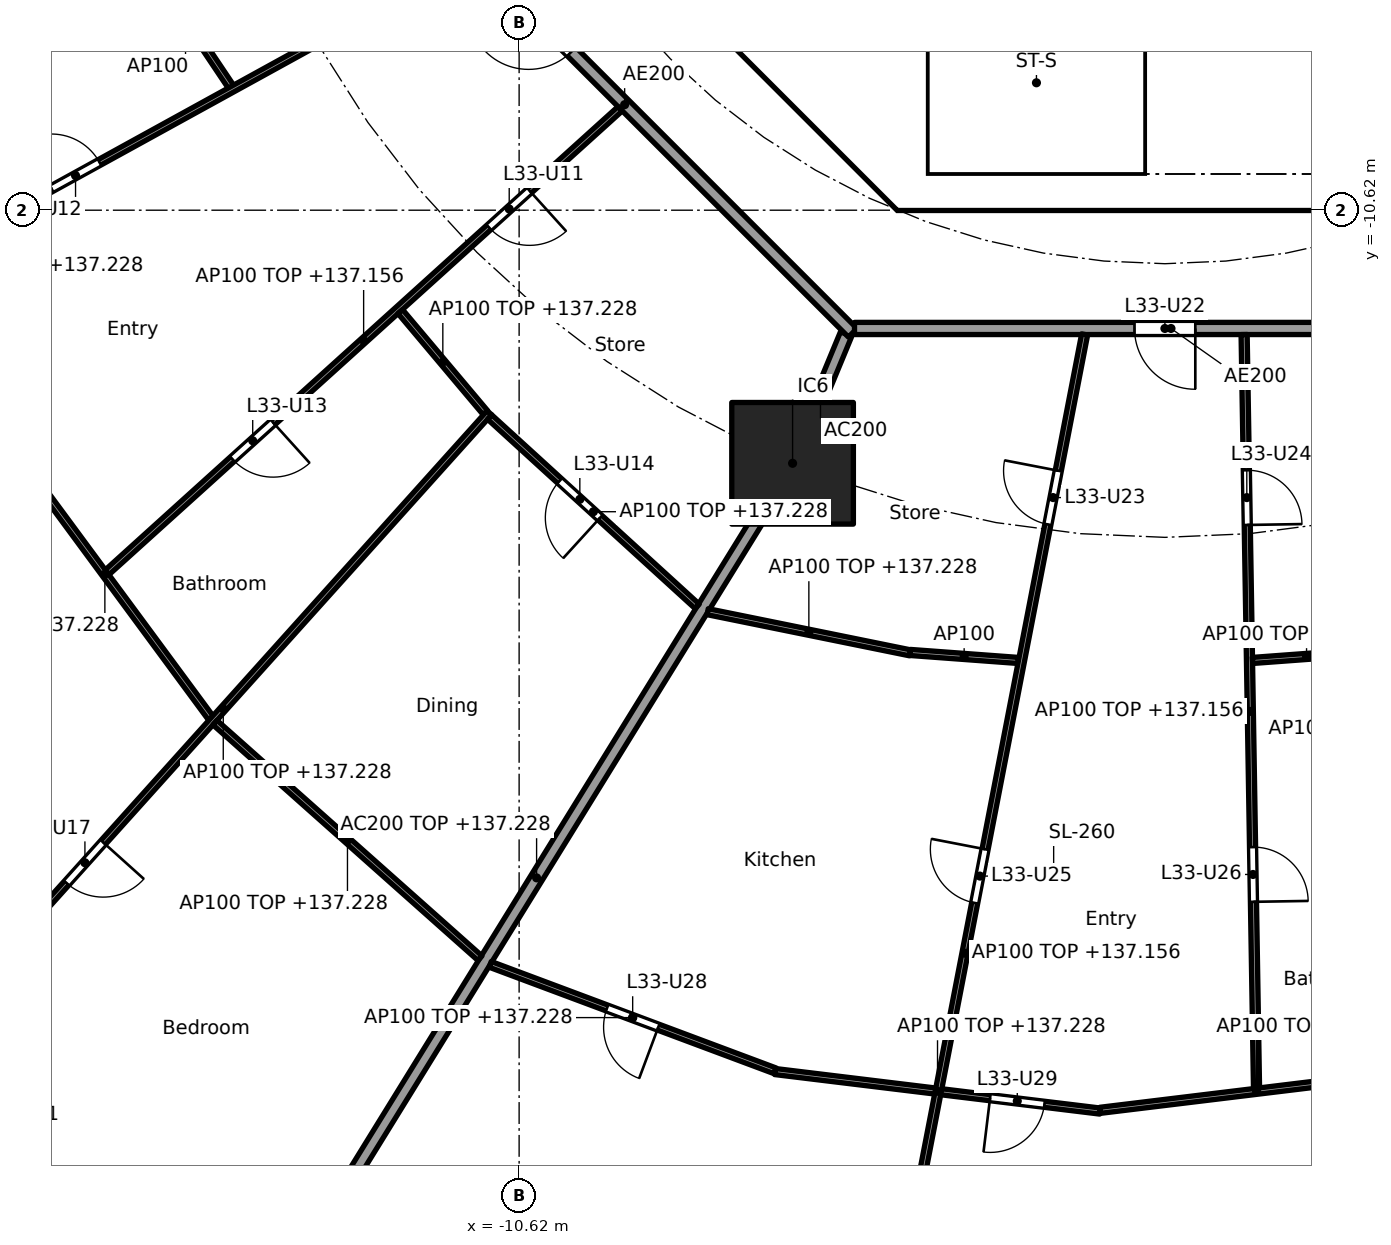
"""IFC4 building model, lengths in metres.
Left out: names, types, materials, properties, quantities, classifications, styles, units other than length and angle.
Written with IfcOpenShell. Run it as: python <this file> out.ifc"""

import sys

from ifc_helpers import new_model, si_unit, direction, frame, frame_2d, origin, origin_2d, place, context, subcontext, project, spatial, polyline, rectangle, outline, extrude, element, fill, save


model = new_model("IFC4")
c1 = context("Model", 3, precision=1e-05, world=origin(), true_north=direction((0.0, 1.0)))
c2 = subcontext(c1, "Body", "Model", "MODEL_VIEW")
j1 = project(units=[si_unit("LENGTHUNIT", "METRE"), si_unit("PLANEANGLEUNIT", "RADIAN")], contexts=[c1])
p1 = place(None, origin())
s1 = spatial("IfcSite", under=j1, at=p1, CompositionType="ELEMENT")
p2 = place(p1, origin())
s2 = spatial("IfcBuilding", under=s1, at=p2, CompositionType="ELEMENT")
p3 = place(p2, frame((0.0, 0.0, 134.4)))
s3 = spatial("IfcBuildingStorey", under=s2, at=p3, CompositionType="ELEMENT", Elevation=134.4)
p4 = place(p3, frame((-6.123, -14.782, 0.0), z_axis=(0.0, 0.0, 1.0), x_axis=(1.0, 0.0, 0.0)))
e1 = element("IfcColumn", 1, at=p4, inside=s3, PredefinedType="COLUMN", context=c2, shape_type="SweptSolid", body=[
    extrude(rectangle(XDim=2.0, YDim=2.0, at=origin_2d()), origin(), (0.0, 0.0, 1.0), 3.7),
])
p5 = place(p3, frame((-9.988, -4.613, 0.0), z_axis=(0.0, 0.0, 1.0), x_axis=(0.707106781187, -0.707106781187, 0.0)))
e2 = element("IfcWall", 2, at=p5, inside=s3, PredefinedType="SHEAR", context=c2, shape_type="SweptSolid", body=[
    extrude(rectangle(XDim=7.602, YDim=0.6, at=frame_2d((3.801, 0.0))), origin(), (0.0, 0.0, 1.0), 3.44),
])
p6 = place(p5, frame((6.151, 0.0, 0.0)))
e3 = element("IfcOpeningElement", 3, at=p6, cuts=e2, PredefinedType="OPENING", context=c2, shape_type="SweptSolid", body=[
    extrude(rectangle(XDim=1.1, YDim=2.1, at=frame_2d((0.55, 1.05))), frame((0.0, 0.31, 0.0), z_axis=(0.0, -1.0, 0.0), x_axis=(1.0, 0.0, 0.0)), (0.0, 0.0, 1.0), 0.62),
])
p7 = place(p3, origin())
e4 = element("IfcWall", 4, at=p7, inside=s3, PredefinedType="SHEAR", context=c2, shape_type="SweptSolid", body=[
    extrude(outline(polyline([(-4.152, -10.025), (4.152, -10.025), (4.401, -9.776), (4.825, -10.2), (4.401, -10.625), (-4.401, -10.625), (-4.825, -10.2), (-4.401, -9.776), (-4.152, -10.025)])), origin(), (0.0, 0.0, 1.0), 3.44),
])
p8 = place(p3, origin())
e5 = element("IfcWall", 5, at=p8, inside=s3, PredefinedType="SOLIDWALL", context=c2, shape_type="SweptSolid", body=[
    extrude(outline(polyline([(-3.9, -10.025), (-4.1, -10.025), (-4.1, -7.025), (-3.9, -7.025), (-3.9, -10.025)])), origin(), (0.0, 0.0, 1.0), 3.44),
])
p9 = place(p3, frame((-5.243, -12.657, 0.0), z_axis=(0.0, 0.0, 1.0), x_axis=(-0.382818775282, -0.923823460025, 0.0)))
e6 = element("IfcWall", 6, at=p9, inside=s3, PredefinedType="PARTITIONING", context=c2, shape_type="SweptSolid", body=[
    extrude(rectangle(XDim=2.201, YDim=0.2, at=frame_2d((1.101, 0.0))), origin(), (0.0, 0.0, 1.0), 3.44),
])
p10 = place(p3, frame((-6.149, -14.825, 0.0), z_axis=(0.0, 0.0, 1.0), x_axis=(-0.525406383516, -0.85085141603, 0.0)))
e7 = element("IfcWall", 7, at=p10, inside=s3, PredefinedType="PARTITIONING", context=c2, shape_type="SweptSolid", body=[
    extrude(rectangle(XDim=15.925, YDim=0.2, at=frame_2d((7.962, 0.0))), origin(), (0.0, 0.0, 1.0), 2.828),
])
p11 = place(p3, frame((-12.635, -5.134, 0.0), z_axis=(0.0, 0.0, 1.0), x_axis=(0.707106781187, -0.707106781187, 0.0)))
e8 = element("IfcWall", 8, at=p11, inside=s3, PredefinedType="PARTITIONING", context=c2, shape_type="SweptSolid", body=[
    extrude(rectangle(XDim=10.609, YDim=0.2, at=frame_2d((5.305, 0.0))), origin(), (0.0, 0.0, 1.0), 3.44),
])
p12 = place(p11, frame((3.07, 0.0, 0.0)))
e9 = element("IfcOpeningElement", 9, at=p12, cuts=e8, PredefinedType="OPENING", context=c2, shape_type="SweptSolid", body=[
    extrude(rectangle(XDim=1.0, YDim=2.1, at=frame_2d((0.5, 1.05))), frame((0.0, 0.11, 0.0), z_axis=(0.0, -1.0, 0.0), x_axis=(1.0, 0.0, 0.0)), (0.0, 0.0, 1.0), 0.22),
])
p13 = place(p3, frame((-5.104, -12.565, 0.0), z_axis=(0.0, 0.0, 1.0), x_axis=(1.0, 0.0, 0.0)))
e10 = element("IfcWall", 10, at=p13, inside=s3, PredefinedType="PARTITIONING", context=c2, shape_type="SweptSolid", body=[
    extrude(rectangle(XDim=10.409, YDim=0.2, at=frame_2d((5.205, 0.0))), origin(), (0.0, 0.0, 1.0), 3.44),
])
p14 = place(p13, frame((4.604, 0.0, 0.0)))
e11 = element("IfcOpeningElement", 11, at=p14, cuts=e10, PredefinedType="OPENING", context=c2, shape_type="SweptSolid", body=[
    extrude(rectangle(XDim=1.0, YDim=2.1, at=frame_2d((0.5, 1.05))), frame((0.0, 0.11, 0.0), z_axis=(0.0, -1.0, 0.0), x_axis=(1.0, 0.0, 0.0)), (0.0, 0.0, 1.0), 0.22),
])
p15 = place(p3, frame((-16.532, -6.84, 0.0), z_axis=(0.0, 0.0, 1.0), x_axis=(0.556994773624, -0.830515997531, 0.0)))
e12 = element("IfcWall", 12, at=p15, inside=s3, PredefinedType="PARTITIONING", context=c2, shape_type="SweptSolid", body=[
    extrude(rectangle(XDim=2.183, YDim=0.1, at=frame_2d((1.092, 0.0))), origin(), (0.0, 0.0, 1.0), 3.44),
])
p16 = place(p3, frame((-11.426, -6.479, 0.0), z_axis=(0.0, 0.0, 1.0), x_axis=(-0.876110392495, -0.482110547657, 0.0)))
e13 = element("IfcWall", 13, at=p16, inside=s3, PredefinedType="PARTITIONING", context=c2, shape_type="SweptSolid", body=[
    extrude(rectangle(XDim=16.955, YDim=0.1, at=frame_2d((8.478, 0.0))), origin(), (0.0, 0.0, 1.0), 2.756),
])
p17 = place(p16, frame((0.35, 0.0, 0.0)))
e14 = element("IfcOpeningElement", 14, at=p17, cuts=e13, PredefinedType="OPENING", context=c2, shape_type="SweptSolid", body=[
    extrude(rectangle(XDim=0.9, YDim=2.1, at=frame_2d((0.45, 1.05))), frame((0.0, 0.06, 0.0), z_axis=(0.0, -1.0, 0.0), x_axis=(1.0, 0.0, 0.0)), (0.0, 0.0, 1.0), 0.12),
])
p18 = place(p16, frame((6.957, 0.0, 0.0)))
e15 = element("IfcOpeningElement", 15, at=p18, cuts=e13, PredefinedType="OPENING", context=c2, shape_type="SweptSolid", body=[
    extrude(rectangle(XDim=0.9, YDim=2.1, at=frame_2d((0.45, 1.05))), frame((0.0, 0.06, 0.0), z_axis=(0.0, -1.0, 0.0), x_axis=(1.0, 0.0, 0.0)), (0.0, 0.0, 1.0), 0.12),
])
p19 = place(p16, frame((13.206, 0.0, 0.0)))
e16 = element("IfcOpeningElement", 16, at=p19, cuts=e13, PredefinedType="OPENING", context=c2, shape_type="SweptSolid", body=[
    extrude(rectangle(XDim=0.9, YDim=2.1, at=frame_2d((0.45, 1.05))), frame((0.0, 0.06, 0.0), z_axis=(0.0, -1.0, 0.0), x_axis=(1.0, 0.0, 0.0)), (0.0, 0.0, 1.0), 0.12),
])
p20 = place(p3, frame((-19.176, -14.244, 0.0), z_axis=(0.0, 0.0, 1.0), x_axis=(0.593532053206, -0.80481035146, 0.0)))
e17 = element("IfcWall", 17, at=p20, inside=s3, PredefinedType="PARTITIONING", context=c2, shape_type="SweptSolid", body=[
    extrude(rectangle(XDim=5.876, YDim=0.1, at=frame_2d((2.938, 0.0))), origin(), (0.0, 0.0, 1.0), 2.828),
])
p21 = place(p3, frame((-8.959, -8.952, 0.0), z_axis=(0.0, 0.0, 1.0), x_axis=(-0.741982736283, -0.670418987692, 0.0)))
e18 = element("IfcWall", 18, at=p21, inside=s3, PredefinedType="PARTITIONING", context=c2, shape_type="SweptSolid", body=[
    extrude(rectangle(XDim=11.371, YDim=0.1, at=frame_2d((5.685, 0.0))), origin(), (0.0, 0.0, 1.0), 2.756),
])
p22 = place(p21, frame((2.009, 0.0, 0.0)))
e19 = element("IfcOpeningElement", 19, at=p22, cuts=e18, PredefinedType="OPENING", context=c2, shape_type="SweptSolid", body=[
    extrude(rectangle(XDim=0.9, YDim=2.1, at=frame_2d((0.45, 1.05))), frame((0.0, 0.06, 0.0), z_axis=(0.0, -1.0, 0.0), x_axis=(1.0, 0.0, 0.0)), (0.0, 0.0, 1.0), 0.12),
])
p23 = place(p21, frame((7.694, 0.0, 0.0)))
e20 = element("IfcOpeningElement", 20, at=p23, cuts=e18, PredefinedType="OPENING", context=c2, shape_type="SweptSolid", body=[
    extrude(rectangle(XDim=0.9, YDim=2.1, at=frame_2d((0.45, 1.05))), frame((0.0, 0.06, 0.0), z_axis=(0.0, -1.0, 0.0), x_axis=(1.0, 0.0, 0.0)), (0.0, 0.0, 1.0), 0.12),
])
p24 = place(p3, frame((-12.575, -12.286, 0.0), z_axis=(0.0, 0.0, 1.0), x_axis=(0.644052758448, -0.764981074495, 0.0)))
e21 = element("IfcWall", 21, at=p24, inside=s3, PredefinedType="PARTITIONING", context=c2, shape_type="SweptSolid", body=[
    extrude(rectangle(XDim=2.174, YDim=0.1, at=frame_2d((1.087, 0.0))), origin(), (0.0, 0.0, 1.0), 2.828),
])
p25 = place(p3, frame((-11.109, -13.951, 0.0), z_axis=(0.0, 0.0, 1.0), x_axis=(-0.668488676691, -0.743722319913, 0.0)))
e22 = element("IfcWall", 22, at=p25, inside=s3, PredefinedType="PARTITIONING", context=c2, shape_type="SweptSolid", body=[
    extrude(rectangle(XDim=13.094, YDim=0.1, at=frame_2d((6.547, 0.0))), origin(), (0.0, 0.0, 1.0), 2.828),
])
p26 = place(p25, frame((9.5, 0.0, 0.0)))
e23 = element("IfcOpeningElement", 23, at=p26, cuts=e22, PredefinedType="OPENING", context=c2, shape_type="SweptSolid", body=[
    extrude(rectangle(XDim=0.9, YDim=2.1, at=frame_2d((0.45, 1.05))), frame((0.0, 0.06, 0.0), z_axis=(0.0, -1.0, 0.0), x_axis=(1.0, 0.0, 0.0)), (0.0, 0.0, 1.0), 0.12),
])
p27 = place(p3, frame((-11.105, -14.021, 0.0), z_axis=(0.0, 0.0, 1.0), x_axis=(0.738880014758, -0.673837015747, 0.0)))
e24 = element("IfcWall", 24, at=p27, inside=s3, PredefinedType="PARTITIONING", context=c2, shape_type="SweptSolid", body=[
    extrude(rectangle(XDim=4.621, YDim=0.1, at=frame_2d((2.31, 0.0))), origin(), (0.0, 0.0, 1.0), 2.828),
])
p28 = place(p27, frame((1.558, 0.0, 0.0)))
e25 = element("IfcOpeningElement", 25, at=p28, cuts=e24, PredefinedType="OPENING", context=c2, shape_type="SweptSolid", body=[
    extrude(rectangle(XDim=0.9, YDim=2.1, at=frame_2d((0.45, 1.05))), frame((0.0, 0.06, 0.0), z_axis=(0.0, -1.0, 0.0), x_axis=(1.0, 0.0, 0.0)), (0.0, 0.0, 1.0), 0.12),
])
p29 = place(p3, frame((-15.622, -19.046, 0.0), z_axis=(0.0, 0.0, 1.0), x_axis=(0.747342322463, -0.664439201925, 0.0)))
e26 = element("IfcWall", 26, at=p29, inside=s3, PredefinedType="PARTITIONING", context=c2, shape_type="SweptSolid", body=[
    extrude(rectangle(XDim=5.831, YDim=0.1, at=frame_2d((2.916, 0.0))), origin(), (0.0, 0.0, 1.0), 2.828),
])
p30 = place(p3, frame((-7.52, -17.222, 0.0), z_axis=(0.0, 0.0, 1.0), x_axis=(0.979964966792, -0.199169937141, 0.0)))
e27 = element("IfcWall", 27, at=p30, inside=s3, PredefinedType="PARTITIONING", context=c2, shape_type="SweptSolid", body=[
    extrude(rectangle(XDim=3.397, YDim=0.1, at=frame_2d((1.698, 0.0))), origin(), (0.0, 0.0, 1.0), 2.828),
])
p31 = place(p3, frame((-11.096, -23.022, 0.0), z_axis=(0.0, 0.0, 1.0), x_axis=(0.936725688471, -0.350064257758, 0.0)))
e28 = element("IfcWall", 28, at=p31, inside=s3, PredefinedType="PARTITIONING", context=c2, shape_type="SweptSolid", body=[
    extrude(rectangle(XDim=5.003, YDim=0.1, at=frame_2d((2.501, 0.0))), origin(), (0.0, 0.0, 1.0), 2.828),
])
p32 = place(p31, frame((2.051, 0.0, 0.0)))
e29 = element("IfcOpeningElement", 29, at=p32, cuts=e28, PredefinedType="OPENING", context=c2, shape_type="SweptSolid", body=[
    extrude(rectangle(XDim=0.9, YDim=2.1, at=frame_2d((0.45, 1.05))), frame((0.0, 0.06, 0.0), z_axis=(0.0, -1.0, 0.0), x_axis=(1.0, 0.0, 0.0)), (0.0, 0.0, 1.0), 0.12),
])
p33 = place(p3, frame((-4.19, -17.893, 0.0), z_axis=(0.0, 0.0, 1.0), x_axis=(0.99727037024, -0.07383636395, 0.0)))
e30 = element("IfcWall", 30, at=p33, inside=s3, PredefinedType="PARTITIONING", context=c2, shape_type="SweptSolid", body=[
    extrude(rectangle(XDim=1.782, YDim=0.1, at=frame_2d((0.891, 0.0))), origin(), (0.0, 0.0, 1.0), 3.44),
])
p34 = place(p3, frame((-6.413, -24.784, 0.0), z_axis=(0.0, 0.0, 1.0), x_axis=(0.99268660964, -0.120719903255, 0.0)))
e31 = element("IfcWall", 31, at=p34, inside=s3, PredefinedType="PARTITIONING", context=c2, shape_type="SweptSolid", body=[
    extrude(rectangle(XDim=5.385, YDim=0.1, at=frame_2d((2.693, 0.0))), origin(), (0.0, 0.0, 1.0), 2.828),
])
p35 = place(p34, frame((3.564, 0.0, 0.0)))
e32 = element("IfcOpeningElement", 32, at=p35, cuts=e31, PredefinedType="OPENING", context=c2, shape_type="SweptSolid", body=[
    extrude(rectangle(XDim=0.9, YDim=2.1, at=frame_2d((0.45, 1.05))), frame((0.0, 0.06, 0.0), z_axis=(0.0, -1.0, 0.0), x_axis=(1.0, 0.0, 0.0)), (0.0, 0.0, 1.0), 0.12),
])
p36 = place(p3, frame((-1.32, -12.663, 0.0), z_axis=(0.0, 0.0, 1.0), x_axis=(-0.189865535907, -0.98181010296, 0.0)))
e33 = element("IfcWall", 33, at=p36, inside=s3, PredefinedType="PARTITIONING", context=c2, shape_type="SweptSolid", body=[
    extrude(rectangle(XDim=20.729, YDim=0.1, at=frame_2d((10.365, 0.0))), origin(), (0.0, 0.0, 1.0), 2.756),
])
p37 = place(p36, frame((2.283, 0.0, 0.0)))
e34 = element("IfcOpeningElement", 34, at=p37, cuts=e33, PredefinedType="OPENING", context=c2, shape_type="SweptSolid", body=[
    extrude(rectangle(XDim=0.9, YDim=2.1, at=frame_2d((0.45, 1.05))), frame((0.0, 0.06, 0.0), z_axis=(0.0, -1.0, 0.0), x_axis=(1.0, 0.0, 0.0)), (0.0, 0.0, 1.0), 0.12),
])
p38 = place(p36, frame((8.622, 0.0, 0.0)))
e35 = element("IfcOpeningElement", 35, at=p38, cuts=e33, PredefinedType="OPENING", context=c2, shape_type="SweptSolid", body=[
    extrude(rectangle(XDim=0.9, YDim=2.1, at=frame_2d((0.45, 1.05))), frame((0.0, 0.06, 0.0), z_axis=(0.0, -1.0, 0.0), x_axis=(1.0, 0.0, 0.0)), (0.0, 0.0, 1.0), 0.12),
])
p39 = place(p3, frame((-1.066, -25.422, 0.0), z_axis=(0.0, 0.0, 1.0), x_axis=(0.992692993044, 0.120667400577, 0.0)))
e36 = element("IfcWall", 36, at=p39, inside=s3, PredefinedType="PARTITIONING", context=c2, shape_type="SweptSolid", body=[
    extrude(rectangle(XDim=5.186, YDim=0.1, at=frame_2d((2.593, 0.0))), origin(), (0.0, 0.0, 1.0), 2.828),
])
p40 = place(p3, frame((1.303, -12.665, 0.0), z_axis=(0.0, 0.0, 1.0), x_axis=(0.016444820401, -0.999864774798, 0.0)))
e37 = element("IfcWall", 37, at=p40, inside=s3, PredefinedType="PARTITIONING", context=c2, shape_type="SweptSolid", body=[
    extrude(rectangle(XDim=12.396, YDim=0.1, at=frame_2d((6.198, 0.0))), origin(), (0.0, 0.0, 1.0), 2.756),
])
p41 = place(p40, frame((2.232, 0.0, 0.0)))
e38 = element("IfcOpeningElement", 38, at=p41, cuts=e37, PredefinedType="OPENING", context=c2, shape_type="SweptSolid", body=[
    extrude(rectangle(XDim=0.9, YDim=2.1, at=frame_2d((0.45, 1.05))), frame((0.0, 0.06, 0.0), z_axis=(0.0, -1.0, 0.0), x_axis=(1.0, 0.0, 0.0)), (0.0, 0.0, 1.0), 0.12),
])
p42 = place(p40, frame((8.43, 0.0, 0.0)))
e39 = element("IfcOpeningElement", 39, at=p42, cuts=e37, PredefinedType="OPENING", context=c2, shape_type="SweptSolid", body=[
    extrude(rectangle(XDim=0.9, YDim=2.1, at=frame_2d((0.45, 1.05))), frame((0.0, 0.06, 0.0), z_axis=(0.0, -1.0, 0.0), x_axis=(1.0, 0.0, 0.0)), (0.0, 0.0, 1.0), 0.12),
])
p43 = place(p3, frame((1.441, -18.024, 0.0), z_axis=(0.0, 0.0, 1.0), x_axis=(0.997269623256, 0.073846452388, 0.0)))
e40 = element("IfcWall", 40, at=p43, inside=s3, PredefinedType="PARTITIONING", context=c2, shape_type="SweptSolid", body=[
    extrude(rectangle(XDim=1.782, YDim=0.1, at=frame_2d((0.891, 0.0))), origin(), (0.0, 0.0, 1.0), 2.828),
])
p44 = place(p6, origin())
e41 = element("IfcDoor", 41, at=p44, inside=s3, OperationType="SINGLE_SWING_LEFT", PredefinedType="DOOR", context=c2, shape_type="SweptSolid", body=[
    extrude(rectangle(XDim=1.1, YDim=2.1, at=frame_2d((0.55, 1.05))), frame((0.0, 0.025, 0.0), z_axis=(0.0, -1.0, 0.0), x_axis=(1.0, 0.0, 0.0)), (0.0, 0.0, 1.0), 0.05),
])
fill(e3, e41)
p45 = place(p12, frame((1.0, 0.0, 0.0), x_axis=(-1.0, 0.0, 0.0)))
e42 = element("IfcDoor", 42, at=p45, inside=s3, OperationType="SINGLE_SWING_RIGHT", PredefinedType="DOOR", context=c2, shape_type="SweptSolid", body=[
    extrude(rectangle(XDim=1.0, YDim=2.1, at=frame_2d((0.5, 1.05))), frame((0.0, 0.025, 0.0), z_axis=(0.0, -1.0, 0.0), x_axis=(1.0, 0.0, 0.0)), (0.0, 0.0, 1.0), 0.05),
])
fill(e9, e42)
p46 = place(p22, origin())
e43 = element("IfcDoor", 43, at=p46, inside=s3, OperationType="SINGLE_SWING_LEFT", PredefinedType="DOOR", context=c2, shape_type="SweptSolid", body=[
    extrude(rectangle(XDim=0.9, YDim=2.1, at=frame_2d((0.45, 1.05))), frame((0.0, 0.025, 0.0), z_axis=(0.0, -1.0, 0.0), x_axis=(1.0, 0.0, 0.0)), (0.0, 0.0, 1.0), 0.05),
])
fill(e19, e43)
p47 = place(p18, frame((0.9, 0.0, 0.0), x_axis=(-1.0, 0.0, 0.0)))
e44 = element("IfcDoor", 44, at=p47, inside=s3, OperationType="SINGLE_SWING_LEFT", PredefinedType="DOOR", context=c2, shape_type="SweptSolid", body=[
    extrude(rectangle(XDim=0.9, YDim=2.1, at=frame_2d((0.45, 1.05))), frame((0.0, 0.025, 0.0), z_axis=(0.0, -1.0, 0.0), x_axis=(1.0, 0.0, 0.0)), (0.0, 0.0, 1.0), 0.05),
])
fill(e15, e44)
p48 = place(p23, origin())
e45 = element("IfcDoor", 45, at=p48, inside=s3, OperationType="SINGLE_SWING_LEFT", PredefinedType="DOOR", context=c2, shape_type="SweptSolid", body=[
    extrude(rectangle(XDim=0.9, YDim=2.1, at=frame_2d((0.45, 1.05))), frame((0.0, 0.025, 0.0), z_axis=(0.0, -1.0, 0.0), x_axis=(1.0, 0.0, 0.0)), (0.0, 0.0, 1.0), 0.05),
])
fill(e20, e45)
p49 = place(p28, frame((0.9, 0.0, 0.0), x_axis=(-1.0, 0.0, 0.0)))
e46 = element("IfcDoor", 46, at=p49, inside=s3, OperationType="SINGLE_SWING_LEFT", PredefinedType="DOOR", context=c2, shape_type="SweptSolid", body=[
    extrude(rectangle(XDim=0.9, YDim=2.1, at=frame_2d((0.45, 1.05))), frame((0.0, 0.025, 0.0), z_axis=(0.0, -1.0, 0.0), x_axis=(1.0, 0.0, 0.0)), (0.0, 0.0, 1.0), 0.05),
])
fill(e25, e46)
p50 = place(p26, origin())
e47 = element("IfcDoor", 47, at=p50, inside=s3, OperationType="SINGLE_SWING_LEFT", PredefinedType="DOOR", context=c2, shape_type="SweptSolid", body=[
    extrude(rectangle(XDim=0.9, YDim=2.1, at=frame_2d((0.45, 1.05))), frame((0.0, 0.025, 0.0), z_axis=(0.0, -1.0, 0.0), x_axis=(1.0, 0.0, 0.0)), (0.0, 0.0, 1.0), 0.05),
])
fill(e23, e47)
p51 = place(p14, frame((1.0, 0.0, 0.0), x_axis=(-1.0, 0.0, 0.0)))
e48 = element("IfcDoor", 48, at=p51, inside=s3, OperationType="SINGLE_SWING_LEFT", PredefinedType="DOOR", context=c2, shape_type="SweptSolid", body=[
    extrude(rectangle(XDim=1.0, YDim=2.1, at=frame_2d((0.5, 1.05))), frame((0.0, 0.025, 0.0), z_axis=(0.0, -1.0, 0.0), x_axis=(1.0, 0.0, 0.0)), (0.0, 0.0, 1.0), 0.05),
])
fill(e11, e48)
p52 = place(p37, frame((0.9, 0.0, 0.0), x_axis=(-1.0, 0.0, 0.0)))
e49 = element("IfcDoor", 49, at=p52, inside=s3, OperationType="SINGLE_SWING_RIGHT", PredefinedType="DOOR", context=c2, shape_type="SweptSolid", body=[
    extrude(rectangle(XDim=0.9, YDim=2.1, at=frame_2d((0.45, 1.05))), frame((0.0, 0.025, 0.0), z_axis=(0.0, -1.0, 0.0), x_axis=(1.0, 0.0, 0.0)), (0.0, 0.0, 1.0), 0.05),
])
fill(e34, e49)
p53 = place(p41, origin())
e50 = element("IfcDoor", 50, at=p53, inside=s3, OperationType="SINGLE_SWING_RIGHT", PredefinedType="DOOR", context=c2, shape_type="SweptSolid", body=[
    extrude(rectangle(XDim=0.9, YDim=2.1, at=frame_2d((0.45, 1.05))), frame((0.0, 0.025, 0.0), z_axis=(0.0, -1.0, 0.0), x_axis=(1.0, 0.0, 0.0)), (0.0, 0.0, 1.0), 0.05),
])
fill(e38, e50)
p54 = place(p38, frame((0.9, 0.0, 0.0), x_axis=(-1.0, 0.0, 0.0)))
e51 = element("IfcDoor", 51, at=p54, inside=s3, OperationType="SINGLE_SWING_RIGHT", PredefinedType="DOOR", context=c2, shape_type="SweptSolid", body=[
    extrude(rectangle(XDim=0.9, YDim=2.1, at=frame_2d((0.45, 1.05))), frame((0.0, 0.025, 0.0), z_axis=(0.0, -1.0, 0.0), x_axis=(1.0, 0.0, 0.0)), (0.0, 0.0, 1.0), 0.05),
])
fill(e35, e51)
p55 = place(p42, origin())
e52 = element("IfcDoor", 52, at=p55, inside=s3, OperationType="SINGLE_SWING_RIGHT", PredefinedType="DOOR", context=c2, shape_type="SweptSolid", body=[
    extrude(rectangle(XDim=0.9, YDim=2.1, at=frame_2d((0.45, 1.05))), frame((0.0, 0.025, 0.0), z_axis=(0.0, -1.0, 0.0), x_axis=(1.0, 0.0, 0.0)), (0.0, 0.0, 1.0), 0.05),
])
fill(e39, e52)
p56 = place(p32, frame((0.9, 0.0, 0.0), x_axis=(-1.0, 0.0, 0.0)))
e53 = element("IfcDoor", 53, at=p56, inside=s3, OperationType="SINGLE_SWING_LEFT", PredefinedType="DOOR", context=c2, shape_type="SweptSolid", body=[
    extrude(rectangle(XDim=0.9, YDim=2.1, at=frame_2d((0.45, 1.05))), frame((0.0, 0.025, 0.0), z_axis=(0.0, -1.0, 0.0), x_axis=(1.0, 0.0, 0.0)), (0.0, 0.0, 1.0), 0.05),
])
fill(e29, e53)
p57 = place(p35, frame((0.9, 0.0, 0.0), x_axis=(-1.0, 0.0, 0.0)))
e54 = element("IfcDoor", 54, at=p57, inside=s3, OperationType="SINGLE_SWING_RIGHT", PredefinedType="DOOR", context=c2, shape_type="SweptSolid", body=[
    extrude(rectangle(XDim=0.9, YDim=2.1, at=frame_2d((0.45, 1.05))), frame((0.0, 0.025, 0.0), z_axis=(0.0, -1.0, 0.0), x_axis=(1.0, 0.0, 0.0)), (0.0, 0.0, 1.0), 0.05),
])
fill(e32, e54)
save(model, sys.argv[1])
